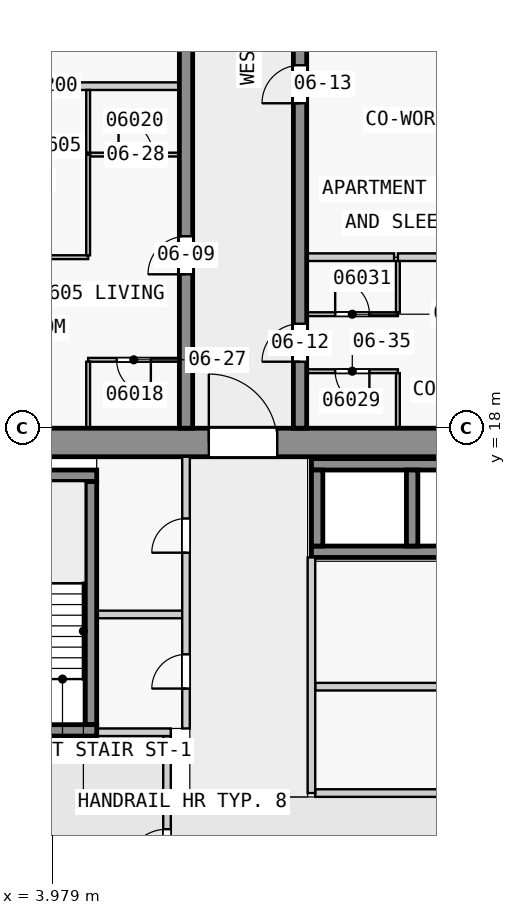
"""IFC4 building model, lengths in metres.
Left out: names, types, materials, properties, quantities, classifications, styles, units other than length and angle.
Written with IfcOpenShell. Run it as: python <this file> out.ifc"""

import sys

from ifc_helpers import new_model, si_unit, direction, frame, frame_2d, origin, place, context, subcontext, project, spatial, rectangle, extrude, element, fill, save


model = new_model("IFC4")
c1 = context("Model", 3, precision=1e-05, world=origin(), true_north=direction((0.0, 1.0)))
c2 = subcontext(c1, "Body", "Model", "MODEL_VIEW")
j1 = project(units=[si_unit("LENGTHUNIT", "METRE"), si_unit("PLANEANGLEUNIT", "RADIAN")], contexts=[c1])
p1 = place(None, origin())
s1 = spatial("IfcSite", under=j1, at=p1, CompositionType="ELEMENT")
p2 = place(p1, origin())
s2 = spatial("IfcBuilding", under=s1, at=p2, CompositionType="ELEMENT")
p3 = place(p2, frame((0.0, 0.0, 30.3)))
s3 = spatial("IfcBuildingStorey", under=s2, at=p3, CompositionType="ELEMENT", Elevation=30.3)
p4 = place(p3, frame((1.55, 17.625, 0.0), z_axis=(0.0, 0.0, 1.0), x_axis=(1.0, 0.0, 0.0)))
e1 = element("IfcWall", 1, at=p4, inside=s3, PredefinedType="SHEAR", context=c2, shape_type="SweptSolid", body=[
    extrude(rectangle(XDim=20.95, YDim=0.75, at=frame_2d((10.475, 0.0))), origin(), (0.0, 0.0, 1.0), 3.25),
])
p5 = place(p4, frame((6.55, 0.0, 0.0)))
e2 = element("IfcOpeningElement", 2, at=p5, cuts=e1, PredefinedType="OPENING", context=c2, shape_type="SweptSolid", body=[
    extrude(rectangle(XDim=1.8, YDim=2.1, at=frame_2d((0.9, 1.05))), frame((0.0, 0.385, 0.0), z_axis=(0.0, -1.0, 0.0), x_axis=(1.0, 0.0, 0.0)), (0.0, 0.0, 1.0), 0.77),
])
p6 = place(p3, frame((2.3, 10.05, 0.0), z_axis=(0.0, 0.0, 1.0), x_axis=(1.0, 0.0, 0.0)))
e3 = element("IfcWall", 3, at=p6, inside=s3, PredefinedType="SHEAR", context=c2, shape_type="SweptSolid", body=[
    extrude(rectangle(XDim=2.85, YDim=0.3, at=frame_2d((1.425, 0.0))), origin(), (0.0, 0.0, 1.0), 3.25),
])
p7 = place(p6, frame((0.25, 0.0, 0.0)))
e4 = element("IfcOpeningElement", 4, at=p7, cuts=e3, PredefinedType="OPENING", context=c2, shape_type="SweptSolid", body=[
    extrude(rectangle(XDim=1.1, YDim=2.1, at=frame_2d((0.55, 1.05))), frame((0.0, 0.16, 0.0), z_axis=(0.0, -1.0, 0.0), x_axis=(1.0, 0.0, 0.0)), (0.0, 0.0, 1.0), 0.32),
])
p8 = place(p3, frame((5.0, 10.2, 0.0), z_axis=(0.0, 0.0, 1.0), x_axis=(0.0, 1.0, 0.0)))
e5 = element("IfcWall", 5, at=p8, inside=s3, PredefinedType="SHEAR", context=c2, shape_type="SweptSolid", body=[
    extrude(rectangle(XDim=6.4, YDim=0.3, at=frame_2d((3.2, 0.0))), origin(), (0.0, 0.0, 1.0), 3.25),
])
p9 = place(p3, frame((2.3, 16.75, 0.0), z_axis=(0.0, 0.0, 1.0), x_axis=(1.0, 0.0, 0.0)))
e6 = element("IfcWall", 6, at=p9, inside=s3, PredefinedType="SHEAR", context=c2, shape_type="SweptSolid", body=[
    extrude(rectangle(XDim=2.85, YDim=0.3, at=frame_2d((1.425, 0.0))), origin(), (0.0, 0.0, 1.0), 3.25),
])
for number, where, z_axis, x_axis in (
    (7, (10.8, 17.05, 0.0), (0.0, 0.0, 1.0), (1.0, 0.0, 0.0)),
    (8, (10.8, 14.75, 0.0), (0.0, 0.0, 1.0), (1.0, 0.0, 0.0)),
):
    element("IfcWall", number, at=place(p3, frame(where, z_axis=z_axis, x_axis=x_axis)), inside=s3, PredefinedType="SHEAR", context=c2, shape_type="SweptSolid", body=[
        extrude(rectangle(XDim=7.8, YDim=0.3, at=frame_2d((3.9, 0.0))), origin(), (0.0, 0.0, 1.0), 3.25),
    ])
for number, where, z_axis, x_axis in (
    (9, (10.95, 14.9, 0.0), (0.0, 0.0, 1.0), (0.0, 1.0, 0.0)),
    (10, (13.45, 14.9, 0.0), (0.0, 0.0, 1.0), (0.0, 1.0, 0.0)),
):
    element("IfcWall", number, at=place(p3, frame(where, z_axis=z_axis, x_axis=x_axis)), inside=s3, PredefinedType="SHEAR", context=c2, shape_type="SweptSolid", body=[
        extrude(rectangle(XDim=2.0, YDim=0.3, at=frame_2d((1.0, 0.0))), origin(), (0.0, 0.0, 1.0), 3.25),
    ])
p10 = place(p3, frame((7.5, 18.0, 0.0), z_axis=(0.0, 0.0, 1.0), x_axis=(0.0, 1.0, 0.0)))
e11 = element("IfcWall", 11, at=p10, inside=s3, PredefinedType="SHEAR", context=c2, shape_type="SweptSolid", body=[
    extrude(rectangle(XDim=27.0, YDim=0.35, at=frame_2d((13.5, 0.0))), origin(), (0.0, 0.0, 1.0), 3.25),
])
p11 = place(p10, frame((4.05, 0.0, 0.0)))
e12 = element("IfcOpeningElement", 12, at=p11, cuts=e11, PredefinedType="OPENING", context=c2, shape_type="SweptSolid", body=[
    extrude(rectangle(XDim=1.0, YDim=2.1, at=frame_2d((0.5, 1.05))), frame((0.0, 0.185, 0.0), z_axis=(0.0, -1.0, 0.0), x_axis=(1.0, 0.0, 0.0)), (0.0, 0.0, 1.0), 0.37),
])
p12 = place(p10, frame((13.05, 0.0, 0.0)))
e13 = element("IfcOpeningElement", 13, at=p12, cuts=e11, PredefinedType="OPENING", context=c2, shape_type="SweptSolid", body=[
    extrude(rectangle(XDim=1.0, YDim=2.1, at=frame_2d((0.5, 1.05))), frame((0.0, 0.185, 0.0), z_axis=(0.0, -1.0, 0.0), x_axis=(1.0, 0.0, 0.0)), (0.0, 0.0, 1.0), 0.37),
])
p13 = place(p10, frame((21.35, 0.0, 0.0)))
e14 = element("IfcOpeningElement", 14, at=p13, cuts=e11, PredefinedType="OPENING", context=c2, shape_type="SweptSolid", body=[
    extrude(rectangle(XDim=1.0, YDim=2.1, at=frame_2d((0.5, 1.05))), frame((0.0, 0.185, 0.0), z_axis=(0.0, -1.0, 0.0), x_axis=(1.0, 0.0, 0.0)), (0.0, 0.0, 1.0), 0.37),
])
p14 = place(p3, frame((10.5, 18.0, 0.0), z_axis=(0.0, 0.0, 1.0), x_axis=(0.0, 1.0, 0.0)))
e15 = element("IfcWall", 15, at=p14, inside=s3, PredefinedType="SHEAR", context=c2, shape_type="SweptSolid", body=[
    extrude(rectangle(XDim=27.0, YDim=0.35, at=frame_2d((13.5, 0.0))), origin(), (0.0, 0.0, 1.0), 3.25),
])
p15 = place(p14, frame((1.75, 0.0, 0.0)))
e16 = element("IfcOpeningElement", 16, at=p15, cuts=e15, PredefinedType="OPENING", context=c2, shape_type="SweptSolid", body=[
    extrude(rectangle(XDim=1.0, YDim=2.1, at=frame_2d((0.5, 1.05))), frame((0.0, 0.185, 0.0), z_axis=(0.0, -1.0, 0.0), x_axis=(1.0, 0.0, 0.0)), (0.0, 0.0, 1.0), 0.37),
])
p16 = place(p14, frame((8.55, 0.0, 0.0)))
e17 = element("IfcOpeningElement", 17, at=p16, cuts=e15, PredefinedType="OPENING", context=c2, shape_type="SweptSolid", body=[
    extrude(rectangle(XDim=1.0, YDim=2.1, at=frame_2d((0.5, 1.05))), frame((0.0, 0.185, 0.0), z_axis=(0.0, -1.0, 0.0), x_axis=(1.0, 0.0, 0.0)), (0.0, 0.0, 1.0), 0.37),
])
p17 = place(p14, frame((15.25, 0.0, 0.0)))
e18 = element("IfcOpeningElement", 18, at=p17, cuts=e15, PredefinedType="OPENING", context=c2, shape_type="SweptSolid", body=[
    extrude(rectangle(XDim=1.0, YDim=2.1, at=frame_2d((0.5, 1.05))), frame((0.0, 0.185, 0.0), z_axis=(0.0, -1.0, 0.0), x_axis=(1.0, 0.0, 0.0)), (0.0, 0.0, 1.0), 0.37),
])
p18 = place(p14, frame((19.75, 0.0, 0.0)))
e19 = element("IfcOpeningElement", 19, at=p18, cuts=e15, PredefinedType="OPENING", context=c2, shape_type="SweptSolid", body=[
    extrude(rectangle(XDim=1.0, YDim=2.1, at=frame_2d((0.5, 1.05))), frame((0.0, 0.185, 0.0), z_axis=(0.0, -1.0, 0.0), x_axis=(1.0, 0.0, 0.0)), (0.0, 0.0, 1.0), 0.37),
])
p19 = place(p14, frame((23.25, 0.0, 0.0)))
e20 = element("IfcOpeningElement", 20, at=p19, cuts=e15, PredefinedType="OPENING", context=c2, shape_type="SweptSolid", body=[
    extrude(rectangle(XDim=0.9, YDim=2.1, at=frame_2d((0.45, 1.05))), frame((0.0, 0.185, 0.0), z_axis=(0.0, -1.0, 0.0), x_axis=(1.0, 0.0, 0.0)), (0.0, 0.0, 1.0), 0.37),
])
p20 = place(p14, frame((25.45, 0.0, 0.0)))
e21 = element("IfcOpeningElement", 21, at=p20, cuts=e15, PredefinedType="OPENING", context=c2, shape_type="SweptSolid", body=[
    extrude(rectangle(XDim=1.0, YDim=2.1, at=frame_2d((0.5, 1.05))), frame((0.0, 0.185, 0.0), z_axis=(0.0, -1.0, 0.0), x_axis=(1.0, 0.0, 0.0)), (0.0, 0.0, 1.0), 0.37),
])
p21 = place(p3, frame((7.0, 5.9, 0.0), z_axis=(0.0, 0.0, 1.0), x_axis=(0.0, 1.0, 0.0)))
e22 = element("IfcWall", 22, at=p21, inside=s3, PredefinedType="PARTITIONING", context=c2, shape_type="SweptSolid", body=[
    extrude(rectangle(XDim=4.0, YDim=0.2, at=frame_2d((2.0, 0.0))), origin(), (0.0, 0.0, 1.0), 3.25),
])
p22 = place(p21, frame((0.45, 0.0, 0.0)))
e23 = element("IfcOpeningElement", 23, at=p22, cuts=e22, PredefinedType="OPENING", context=c2, shape_type="SweptSolid", body=[
    extrude(rectangle(XDim=1.1, YDim=2.1, at=frame_2d((0.55, 1.05))), frame((0.0, 0.11, 0.0), z_axis=(0.0, -1.0, 0.0), x_axis=(1.0, 0.0, 0.0)), (0.0, 0.0, 1.0), 0.22),
])
p23 = place(p3, frame((5.15, 10.0, 0.0), z_axis=(0.0, 0.0, 1.0), x_axis=(1.0, 0.0, 0.0)))
e24 = element("IfcWall", 24, at=p23, inside=s3, PredefinedType="PARTITIONING", context=c2, shape_type="SweptSolid", body=[
    extrude(rectangle(XDim=1.95, YDim=0.2, at=frame_2d((0.975, 0.0))), origin(), (0.0, 0.0, 1.0), 3.25),
])
p24 = place(p3, frame((10.8, 8.4, 0.0), z_axis=(0.0, 0.0, 1.0), x_axis=(0.0, 1.0, 0.0)))
e25 = element("IfcWall", 25, at=p24, inside=s3, PredefinedType="PARTITIONING", context=c2, shape_type="SweptSolid", body=[
    extrude(rectangle(XDim=6.2, YDim=0.2, at=frame_2d((3.1, 0.0))), origin(), (0.0, 0.0, 1.0), 3.25),
])
for number, where, z_axis, x_axis in (
    (26, (10.9, 8.4, 0.0), (0.0, 0.0, 1.0), (1.0, 0.0, 0.0)),
    (27, (10.9, 11.2, 0.0), (0.0, 0.0, 1.0), (1.0, 0.0, 0.0)),
):
    element("IfcWall", number, at=place(p3, frame(where, z_axis=z_axis, x_axis=x_axis)), inside=s3, PredefinedType="PARTITIONING", context=c2, shape_type="SweptSolid", body=[
        extrude(rectangle(XDim=7.4, YDim=0.2, at=frame_2d((3.7, 0.0))), origin(), (0.0, 0.0, 1.0), 3.25),
    ])
p25 = place(p3, frame((7.5, 10.1, 0.0), z_axis=(0.0, 0.0, 1.0), x_axis=(0.0, 1.0, 0.0)))
e28 = element("IfcWall", 28, at=p25, inside=s3, PredefinedType="PARTITIONING", context=c2, shape_type="SweptSolid", body=[
    extrude(rectangle(XDim=7.15, YDim=0.2, at=frame_2d((3.575, 0.0))), origin(), (0.0, 0.0, 1.0), 3.25),
])
p26 = place(p25, frame((1.05, 0.0, 0.0)))
e29 = element("IfcOpeningElement", 29, at=p26, cuts=e28, PredefinedType="OPENING", context=c2, shape_type="SweptSolid", body=[
    extrude(rectangle(XDim=0.9, YDim=2.1, at=frame_2d((0.45, 1.05))), frame((0.0, 0.11, 0.0), z_axis=(0.0, -1.0, 0.0), x_axis=(1.0, 0.0, 0.0)), (0.0, 0.0, 1.0), 0.22),
])
p27 = place(p25, frame((4.625, 0.0, 0.0)))
e30 = element("IfcOpeningElement", 30, at=p27, cuts=e28, PredefinedType="OPENING", context=c2, shape_type="SweptSolid", body=[
    extrude(rectangle(XDim=0.9, YDim=2.1, at=frame_2d((0.45, 1.05))), frame((0.0, 0.11, 0.0), z_axis=(0.0, -1.0, 0.0), x_axis=(1.0, 0.0, 0.0)), (0.0, 0.0, 1.0), 0.22),
])
p28 = place(p3, frame((5.15, 13.1, 0.0), z_axis=(0.0, 0.0, 1.0), x_axis=(1.0, 0.0, 0.0)))
e31 = element("IfcWall", 31, at=p28, inside=s3, PredefinedType="PARTITIONING", context=c2, shape_type="SweptSolid", body=[
    extrude(rectangle(XDim=2.25, YDim=0.2, at=frame_2d((1.125, 0.0))), origin(), (0.0, 0.0, 1.0), 3.25),
])
p29 = place(p3, frame((13.075, 19.5, 0.0), z_axis=(0.0, 0.0, 1.0), x_axis=(-1.0, 0.0, 0.0)))
e32 = element("IfcWall", 32, at=p29, inside=s3, PredefinedType="PARTITIONING", context=c2, shape_type="SweptSolid", body=[
    extrude(rectangle(XDim=2.4, YDim=0.1, at=frame_2d((1.2, 0.0))), origin(), (0.0, 0.0, 1.0), 3.25),
])
p30 = place(p29, frame((0.75, 0.0, 0.0)))
e33 = element("IfcOpeningElement", 33, at=p30, cuts=e32, PredefinedType="OPENING", context=c2, shape_type="SweptSolid", body=[
    extrude(rectangle(XDim=0.9, YDim=2.1, at=frame_2d((0.45, 1.05))), frame((0.0, 0.06, 0.0), z_axis=(0.0, -1.0, 0.0), x_axis=(1.0, 0.0, 0.0)), (0.0, 0.0, 1.0), 0.12),
])
p31 = place(p3, frame((7.325, 19.8, 0.0), z_axis=(0.0, 0.0, 1.0), x_axis=(-1.0, 0.0, 0.0)))
e34 = element("IfcWall", 34, at=p31, inside=s3, PredefinedType="PARTITIONING", context=c2, shape_type="SweptSolid", body=[
    extrude(rectangle(XDim=2.4, YDim=0.1, at=frame_2d((1.2, 0.0))), origin(), (0.0, 0.0, 1.0), 3.25),
])
p32 = place(p31, frame((0.75, 0.0, 0.0)))
e35 = element("IfcOpeningElement", 35, at=p32, cuts=e34, PredefinedType="OPENING", context=c2, shape_type="SweptSolid", body=[
    extrude(rectangle(XDim=0.9, YDim=2.1, at=frame_2d((0.45, 1.05))), frame((0.0, 0.06, 0.0), z_axis=(0.0, -1.0, 0.0), x_axis=(1.0, 0.0, 0.0)), (0.0, 0.0, 1.0), 0.12),
])
p33 = place(p3, frame((10.675, 21.0, 0.0), z_axis=(0.0, 0.0, 1.0), x_axis=(1.0, 0.0, 0.0)))
e36 = element("IfcWall", 36, at=p33, inside=s3, PredefinedType="PARTITIONING", context=c2, shape_type="SweptSolid", body=[
    extrude(rectangle(XDim=2.4, YDim=0.1, at=frame_2d((1.2, 0.0))), origin(), (0.0, 0.0, 1.0), 3.25),
])
p34 = place(p33, frame((0.75, 0.0, 0.0)))
e37 = element("IfcOpeningElement", 37, at=p34, cuts=e36, PredefinedType="OPENING", context=c2, shape_type="SweptSolid", body=[
    extrude(rectangle(XDim=0.9, YDim=2.1, at=frame_2d((0.45, 1.05))), frame((0.0, 0.06, 0.0), z_axis=(0.0, -1.0, 0.0), x_axis=(1.0, 0.0, 0.0)), (0.0, 0.0, 1.0), 0.12),
])
p35 = place(p3, frame((0.15, 22.5, 0.0), z_axis=(0.0, 0.0, 1.0), x_axis=(1.0, 0.0, 0.0)))
e38 = element("IfcWall", 38, at=p35, inside=s3, PredefinedType="PARTITIONING", context=c2, shape_type="SweptSolid", body=[
    extrude(rectangle(XDim=4.775, YDim=0.1, at=frame_2d((2.388, 0.0))), origin(), (0.0, 0.0, 1.0), 3.25),
])
p36 = place(p35, frame((1.95, 0.0, 0.0)))
e39 = element("IfcOpeningElement", 39, at=p36, cuts=e38, PredefinedType="OPENING", context=c2, shape_type="SweptSolid", body=[
    extrude(rectangle(XDim=0.9, YDim=2.1, at=frame_2d((0.45, 1.05))), frame((0.0, 0.06, 0.0), z_axis=(0.0, -1.0, 0.0), x_axis=(1.0, 0.0, 0.0)), (0.0, 0.0, 1.0), 0.12),
])
p37 = place(p3, frame((12.975, 22.5, 0.0), z_axis=(0.0, 0.0, 1.0), x_axis=(-1.0, 0.0, 0.0)))
e40 = element("IfcWall", 40, at=p37, inside=s3, PredefinedType="PARTITIONING", context=c2, shape_type="SweptSolid", body=[
    extrude(rectangle(XDim=2.3, YDim=0.2, at=frame_2d((1.15, 0.0))), origin(), (0.0, 0.0, 1.0), 3.25),
])
p38 = place(p3, frame((13.075, 22.5, 0.0), z_axis=(0.0, 0.0, 1.0), x_axis=(1.0, 0.0, 0.0)))
e41 = element("IfcWall", 41, at=p38, inside=s3, PredefinedType="PARTITIONING", context=c2, shape_type="SweptSolid", body=[
    extrude(rectangle(XDim=5.005, YDim=0.2, at=frame_2d((2.502, 0.0))), origin(), (0.0, 0.0, 1.0), 3.25),
])
p39 = place(p3, frame((4.975, 25.2, 0.0), z_axis=(0.0, 0.0, 1.0), x_axis=(1.0, 0.0, 0.0)))
e42 = element("IfcWall", 42, at=p39, inside=s3, PredefinedType="PARTITIONING", context=c2, shape_type="SweptSolid", body=[
    extrude(rectangle(XDim=2.35, YDim=0.1, at=frame_2d((1.175, 0.0))), origin(), (0.0, 0.0, 1.0), 3.25),
])
p40 = place(p39, frame((0.75, 0.0, 0.0)))
e43 = element("IfcOpeningElement", 43, at=p40, cuts=e42, PredefinedType="OPENING", context=c2, shape_type="SweptSolid", body=[
    extrude(rectangle(XDim=0.9, YDim=2.1, at=frame_2d((0.45, 1.05))), frame((0.0, 0.06, 0.0), z_axis=(0.0, -1.0, 0.0), x_axis=(1.0, 0.0, 0.0)), (0.0, 0.0, 1.0), 0.12),
])
p41 = place(p3, frame((7.325, 27.0, 0.0), z_axis=(0.0, 0.0, 1.0), x_axis=(-1.0, 0.0, 0.0)))
e44 = element("IfcWall", 44, at=p41, inside=s3, PredefinedType="PARTITIONING", context=c2, shape_type="SweptSolid", body=[
    extrude(rectangle(XDim=7.175, YDim=0.2, at=frame_2d((3.587, 0.0))), origin(), (0.0, 0.0, 1.0), 3.25),
])
p42 = place(p3, frame((4.925, 19.75, 0.0), z_axis=(0.0, 0.0, 1.0), x_axis=(0.0, -1.0, 0.0)))
e45 = element("IfcWall", 45, at=p42, inside=s3, PredefinedType="PARTITIONING", context=c2, shape_type="SweptSolid", body=[
    extrude(rectangle(XDim=1.75, YDim=0.1, at=frame_2d((0.875, 0.0))), origin(), (0.0, 0.0, 1.0), 3.25),
])
p43 = place(p3, frame((4.925, 26.9, 0.0), z_axis=(0.0, 0.0, 1.0), x_axis=(0.0, -1.0, 0.0)))
e46 = element("IfcWall", 46, at=p43, inside=s3, PredefinedType="PARTITIONING", context=c2, shape_type="SweptSolid", body=[
    extrude(rectangle(XDim=1.65, YDim=0.1, at=frame_2d((0.825, 0.0))), origin(), (0.0, 0.0, 1.0), 3.25),
])
p44 = place(p3, frame((4.925, 22.55, 0.0), z_axis=(0.0, 0.0, 1.0), x_axis=(0.0, 1.0, 0.0)))
e47 = element("IfcWall", 47, at=p44, inside=s3, PredefinedType="PARTITIONING", context=c2, shape_type="SweptSolid", body=[
    extrude(rectangle(XDim=2.65, YDim=0.1, at=frame_2d((1.325, 0.0))), origin(), (0.0, 0.0, 1.0), 3.25),
])
p45 = place(p3, frame((13.075, 18.0, 0.0), z_axis=(0.0, 0.0, 1.0), x_axis=(0.0, 1.0, 0.0)))
e48 = element("IfcWall", 48, at=p45, inside=s3, PredefinedType="PARTITIONING", context=c2, shape_type="SweptSolid", body=[
    extrude(rectangle(XDim=1.45, YDim=0.1, at=frame_2d((0.725, 0.0))), origin(), (0.0, 0.0, 1.0), 3.25),
])
p46 = place(p3, frame((13.075, 21.05, 0.0), z_axis=(0.0, 0.0, 1.0), x_axis=(0.0, 1.0, 0.0)))
e49 = element("IfcWall", 49, at=p46, inside=s3, PredefinedType="PARTITIONING", context=c2, shape_type="SweptSolid", body=[
    extrude(rectangle(XDim=1.35, YDim=0.1, at=frame_2d((0.675, 0.0))), origin(), (0.0, 0.0, 1.0), 3.25),
])
p47 = place(p22, origin())
e50 = element("IfcDoor", 50, at=p47, inside=s3, OperationType="SINGLE_SWING_LEFT", PredefinedType="DOOR", context=c2, shape_type="SweptSolid", body=[
    extrude(rectangle(XDim=1.1, YDim=2.1, at=frame_2d((0.55, 1.05))), frame((0.0, 0.025, 0.0), z_axis=(0.0, -1.0, 0.0), x_axis=(1.0, 0.0, 0.0)), (0.0, 0.0, 1.0), 0.05),
])
fill(e23, e50)
p48 = place(p5, origin())
e51 = element("IfcDoor", 51, at=p48, inside=s3, OperationType="DOUBLE_DOOR_SINGLE_SWING", PredefinedType="DOOR", context=c2, shape_type="SweptSolid", body=[
    extrude(rectangle(XDim=1.8, YDim=2.1, at=frame_2d((0.9, 1.05))), frame((0.0, 0.025, 0.0), z_axis=(0.0, -1.0, 0.0), x_axis=(1.0, 0.0, 0.0)), (0.0, 0.0, 1.0), 0.05),
])
fill(e2, e51)
p49 = place(p26, origin())
e52 = element("IfcDoor", 52, at=p49, inside=s3, OperationType="SINGLE_SWING_RIGHT", PredefinedType="DOOR", context=c2, shape_type="SweptSolid", body=[
    extrude(rectangle(XDim=0.9, YDim=2.1, at=frame_2d((0.45, 1.05))), frame((0.0, 0.025, 0.0), z_axis=(0.0, -1.0, 0.0), x_axis=(1.0, 0.0, 0.0)), (0.0, 0.0, 1.0), 0.05),
])
fill(e29, e52)
p50 = place(p27, origin())
e53 = element("IfcDoor", 53, at=p50, inside=s3, OperationType="SINGLE_SWING_RIGHT", PredefinedType="DOOR", context=c2, shape_type="SweptSolid", body=[
    extrude(rectangle(XDim=0.9, YDim=2.1, at=frame_2d((0.45, 1.05))), frame((0.0, 0.025, 0.0), z_axis=(0.0, -1.0, 0.0), x_axis=(1.0, 0.0, 0.0)), (0.0, 0.0, 1.0), 0.05),
])
fill(e30, e53)
p51 = place(p11, origin())
e54 = element("IfcDoor", 54, at=p51, inside=s3, OperationType="SINGLE_SWING_LEFT", PredefinedType="DOOR", context=c2, shape_type="SweptSolid", body=[
    extrude(rectangle(XDim=1.0, YDim=2.1, at=frame_2d((0.5, 1.05))), frame((0.0, 0.025, 0.0), z_axis=(0.0, -1.0, 0.0), x_axis=(1.0, 0.0, 0.0)), (0.0, 0.0, 1.0), 0.05),
])
fill(e12, e54)
p52 = place(p15, origin())
e55 = element("IfcDoor", 55, at=p52, inside=s3, OperationType="SINGLE_SWING_LEFT", PredefinedType="DOOR", context=c2, shape_type="SweptSolid", body=[
    extrude(rectangle(XDim=1.0, YDim=2.1, at=frame_2d((0.5, 1.05))), frame((0.0, 0.025, 0.0), z_axis=(0.0, -1.0, 0.0), x_axis=(1.0, 0.0, 0.0)), (0.0, 0.0, 1.0), 0.05),
])
fill(e16, e55)
p53 = place(p16, origin())
e56 = element("IfcDoor", 56, at=p53, inside=s3, OperationType="SINGLE_SWING_LEFT", PredefinedType="DOOR", context=c2, shape_type="SweptSolid", body=[
    extrude(rectangle(XDim=1.0, YDim=2.1, at=frame_2d((0.5, 1.05))), frame((0.0, 0.025, 0.0), z_axis=(0.0, -1.0, 0.0), x_axis=(1.0, 0.0, 0.0)), (0.0, 0.0, 1.0), 0.05),
])
fill(e17, e56)
p54 = place(p32, origin())
e57 = element("IfcDoor", 57, at=p54, inside=s3, OperationType="SINGLE_SWING_LEFT", PredefinedType="DOOR", context=c2, shape_type="SweptSolid", body=[
    extrude(rectangle(XDim=0.9, YDim=2.1, at=frame_2d((0.45, 1.05))), frame((0.0, 0.025, 0.0), z_axis=(0.0, -1.0, 0.0), x_axis=(1.0, 0.0, 0.0)), (0.0, 0.0, 1.0), 0.05),
])
fill(e35, e57)
p55 = place(p40, origin())
e58 = element("IfcDoor", 58, at=p55, inside=s3, OperationType="SINGLE_SWING_RIGHT", PredefinedType="DOOR", context=c2, shape_type="SweptSolid", body=[
    extrude(rectangle(XDim=0.9, YDim=2.1, at=frame_2d((0.45, 1.05))), frame((0.0, 0.025, 0.0), z_axis=(0.0, -1.0, 0.0), x_axis=(1.0, 0.0, 0.0)), (0.0, 0.0, 1.0), 0.05),
])
fill(e43, e58)
p56 = place(p30, origin())
e59 = element("IfcDoor", 59, at=p56, inside=s3, OperationType="SINGLE_SWING_RIGHT", PredefinedType="DOOR", context=c2, shape_type="SweptSolid", body=[
    extrude(rectangle(XDim=0.9, YDim=2.1, at=frame_2d((0.45, 1.05))), frame((0.0, 0.025, 0.0), z_axis=(0.0, -1.0, 0.0), x_axis=(1.0, 0.0, 0.0)), (0.0, 0.0, 1.0), 0.05),
])
fill(e33, e59)
p57 = place(p34, origin())
e60 = element("IfcDoor", 60, at=p57, inside=s3, OperationType="SINGLE_SWING_RIGHT", PredefinedType="DOOR", context=c2, shape_type="SweptSolid", body=[
    extrude(rectangle(XDim=0.9, YDim=2.1, at=frame_2d((0.45, 1.05))), frame((0.0, 0.025, 0.0), z_axis=(0.0, -1.0, 0.0), x_axis=(1.0, 0.0, 0.0)), (0.0, 0.0, 1.0), 0.05),
])
fill(e37, e60)
save(model, sys.argv[1])
